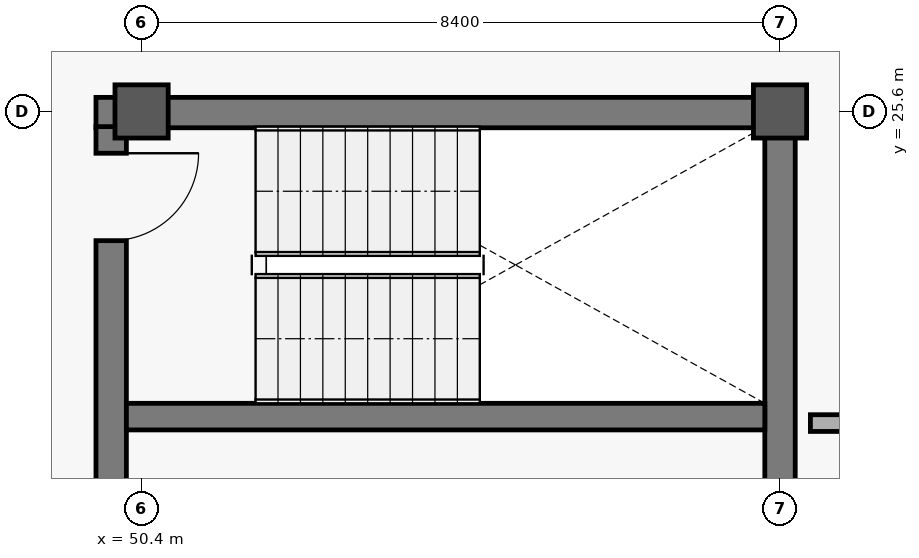
"""IFC4 building model, lengths in metres.
Left out: names, types, materials, properties, quantities, classifications, styles, units other than length and angle.
Written with IfcOpenShell. Run it as: python <this file> out.ifc"""

import sys

from ifc_helpers import new_model, si_unit, direction, frame, frame_2d, origin, origin_2d, place, context, subcontext, project, spatial, rectangle, extrude, element, fill, save


model = new_model("IFC4")
c1 = context("Model", 3, precision=1e-05, world=origin(), true_north=direction((0.0, 1.0)))
c2 = subcontext(c1, "Body", "Model", "MODEL_VIEW")
j1 = project(units=[si_unit("LENGTHUNIT", "METRE"), si_unit("PLANEANGLEUNIT", "RADIAN")], contexts=[c1])
p1 = place(None, origin())
s1 = spatial("IfcSite", under=j1, at=p1, CompositionType="ELEMENT")
p2 = place(p1, origin())
s2 = spatial("IfcBuilding", under=s1, at=p2, CompositionType="ELEMENT")
p3 = place(p2, frame((0.0, 0.0, 19.2)))
s3 = spatial("IfcBuildingStorey", under=s2, at=p3, CompositionType="ELEMENT", Elevation=19.2)
for number, where, z_axis, x_axis in (
    (1, (50.4, 25.6, 0.0), (0.0, 0.0, 1.0), (1.0, 0.0, 0.0)),
    (2, (58.8, 25.6, 0.0), (0.0, 0.0, 1.0), (1.0, 0.0, 0.0)),
):
    element("IfcColumn", number, at=place(p3, frame(where, z_axis=z_axis, x_axis=x_axis)), inside=s3, PredefinedType="COLUMN", context=c2, shape_type="SweptSolid", body=[
        extrude(rectangle(XDim=0.7, YDim=0.7, at=origin_2d()), origin(), (0.0, 0.0, 1.0), 3.6),
    ])
p4 = place(p3, frame((59.0, 25.585, 0.0), z_axis=(0.0, 0.0, 1.0), x_axis=(-1.0, 0.0, 0.0)))
e3 = element("IfcWall", 3, at=p4, inside=s3, PredefinedType="SHEAR", context=c2, shape_type="SweptSolid", body=[
    extrude(rectangle(XDim=9.2, YDim=0.4, at=frame_2d((4.6, 0.0))), origin(), (0.0, 0.0, 1.0), 3.32),
])
p5 = place(p3, frame((50.0, 25.4, 0.0), z_axis=(0.0, 0.0, 1.0), x_axis=(0.0, -1.0, 0.0)))
e4 = element("IfcWall", 4, at=p5, inside=s3, PredefinedType="SHEAR", context=c2, shape_type="SweptSolid", body=[
    extrude(rectangle(XDim=7.4, YDim=0.4, at=frame_2d((3.7, 0.0))), origin(), (0.0, 0.0, 1.0), 3.32),
])
p6 = place(p5, frame((0.35, 0.0, 0.0)))
e5 = element("IfcOpeningElement", 5, at=p6, cuts=e4, PredefinedType="OPENING", context=c2, shape_type="SweptSolid", body=[
    extrude(rectangle(XDim=1.15, YDim=2.2, at=frame_2d((0.575, 1.1))), frame((0.0, 0.21, 0.0), z_axis=(0.0, -1.0, 0.0), x_axis=(1.0, 0.0, 0.0)), (0.0, 0.0, 1.0), 0.42),
])
p7 = place(p3, frame((58.8, 18.0, 0.0), z_axis=(0.0, 0.0, 1.0), x_axis=(0.0, 1.0, 0.0)))
e6 = element("IfcWall", 6, at=p7, inside=s3, PredefinedType="SHEAR", context=c2, shape_type="SweptSolid", body=[
    extrude(rectangle(XDim=7.4, YDim=0.4, at=frame_2d((3.7, 0.0))), origin(), (0.0, 0.0, 1.0), 3.32),
])
p8 = place(p3, frame((50.2, 21.585, 0.0), z_axis=(0.0, 0.0, 1.0), x_axis=(1.0, 0.0, 0.0)))
e7 = element("IfcWall", 7, at=p8, inside=s3, PredefinedType="SHEAR", context=c2, shape_type="SweptSolid", body=[
    extrude(rectangle(XDim=8.4, YDim=0.35, at=frame_2d((4.2, 0.0))), origin(), (0.0, 0.0, 1.0), 3.32),
])
p9 = place(p3, frame((59.2, 21.5, 0.0), z_axis=(0.0, 0.0, 1.0), x_axis=(1.0, 0.0, 0.0)))
e8 = element("IfcWall", 8, at=p9, inside=s3, PredefinedType="SOLIDWALL", context=c2, shape_type="SweptSolid", body=[
    extrude(rectangle(XDim=4.8, YDim=0.22, at=frame_2d((2.4, 0.0))), origin(), (0.0, 0.0, 1.0), 2.47),
])
p10 = place(p9, frame((1.15, 0.0, 0.0)))
e9 = element("IfcOpeningElement", 9, at=p10, cuts=e8, PredefinedType="OPENING", context=c2, shape_type="SweptSolid", body=[
    extrude(rectangle(XDim=1.25, YDim=2.2, at=frame_2d((0.625, 1.1))), frame((0.0, 0.12, 0.0), z_axis=(0.0, -1.0, 0.0), x_axis=(1.0, 0.0, 0.0)), (0.0, 0.0, 1.0), 0.24),
])
p11 = place(p6, origin())
e10 = element("IfcDoor", 10, at=p11, inside=s3, OperationType="SINGLE_SWING_LEFT", PredefinedType="DOOR", context=c2, shape_type="SweptSolid", body=[
    extrude(rectangle(XDim=1.15, YDim=2.2, at=frame_2d((0.575, 1.1))), frame((0.0, 0.025, 0.0), z_axis=(0.0, -1.0, 0.0), x_axis=(1.0, 0.0, 0.0)), (0.0, 0.0, 1.0), 0.05),
])
fill(e5, e10)
save(model, sys.argv[1])
